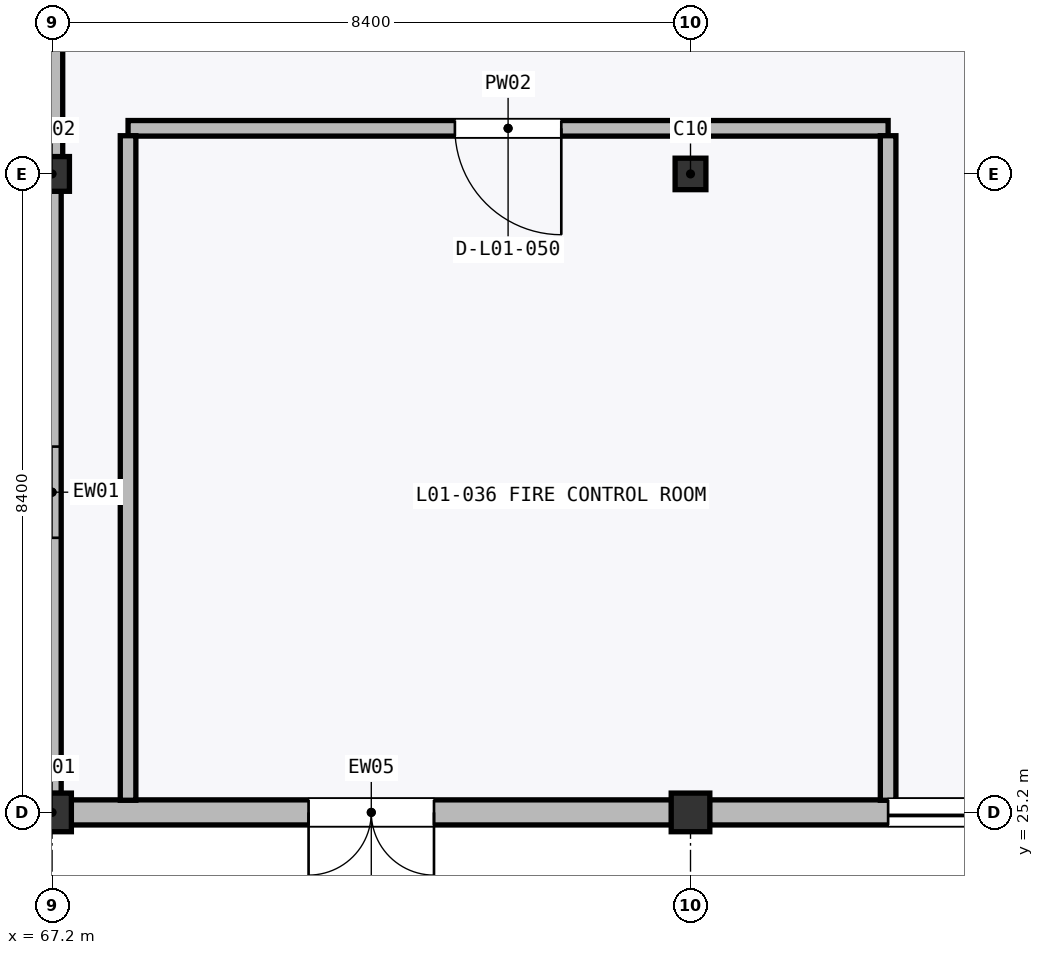
"""IFC4 building model, lengths in metres.
Left out: names, types, materials, properties, quantities, classifications, styles, units other than length and angle.
Written with IfcOpenShell. Run it as: python <this file> out.ifc"""

import sys

from ifc_helpers import new_model, si_unit, direction, frame, frame_2d, origin, origin_2d, place, context, subcontext, project, spatial, rectangle, hollow_circle, i_section, extrude, element, fill, save


model = new_model("IFC4")
c1 = context("Model", 3, precision=1e-05, world=origin(), true_north=direction((0.0, 1.0)))
c2 = subcontext(c1, "Body", "Model", "MODEL_VIEW")
j1 = project(units=[si_unit("LENGTHUNIT", "METRE"), si_unit("PLANEANGLEUNIT", "RADIAN")], contexts=[c1])
p1 = place(None, origin())
s1 = spatial("IfcSite", under=j1, at=p1, CompositionType="ELEMENT")
p2 = place(p1, origin())
s2 = spatial("IfcBuilding", under=s1, at=p2, CompositionType="ELEMENT")
p3 = place(p2, origin())
s3 = spatial("IfcBuildingStorey", under=s2, at=p3, CompositionType="ELEMENT", Elevation=0.0)
p4 = place(p3, frame((67.2, 25.2, 0.0), z_axis=(0.0, 0.0, 1.0), x_axis=(1.0, 0.0, 0.0)))
e1 = element("IfcColumn", 1, at=p4, inside=s3, PredefinedType="COLUMN", context=c2, shape_type="SweptSolid", body=[
    extrude(hollow_circle(Radius=0.254, WallThickness=0.016, at=origin_2d()), origin(), (0.0, 0.0, 1.0), 6.0),
])
p5 = place(p3, frame((67.2, 33.6, 0.0), z_axis=(0.0, 0.0, 1.0), x_axis=(1.0, 0.0, 0.0)))
e2 = element("IfcColumn", 2, at=p5, inside=s3, PredefinedType="COLUMN", context=c2, shape_type="SweptSolid", body=[
    extrude(hollow_circle(Radius=0.229, WallThickness=0.016, at=origin_2d()), origin(), (0.0, 0.0, 1.0), 6.0),
])
p6 = place(p3, frame((75.6, 25.2, 0.0), z_axis=(0.0, 0.0, 1.0), x_axis=(1.0, 0.0, 0.0)))
e3 = element("IfcColumn", 3, at=p6, inside=s3, PredefinedType="COLUMN", context=c2, shape_type="SweptSolid", body=[
    extrude(hollow_circle(Radius=0.254, WallThickness=0.016, at=origin_2d()), origin(), (0.0, 0.0, 1.0), 6.0),
])
p7 = place(p3, frame((75.6, 33.6, 0.0), z_axis=(0.0, 0.0, 1.0), x_axis=(1.0, 0.0, 0.0)))
e4 = element("IfcColumn", 4, at=p7, inside=s3, PredefinedType="COLUMN", context=c2, shape_type="SweptSolid", body=[
    extrude(i_section(OverallWidth=0.405, OverallDepth=0.414, WebThickness=0.018, FlangeThickness=0.028, FilletRadius=0.022, at=origin_2d()), origin(), (0.0, 0.0, 1.0), 6.0),
])
p8 = place(p3, frame((67.2, 41.655, 0.0), z_axis=(0.0, 0.0, 1.0), x_axis=(0.0, -1.0, 0.0)))
e5 = element("IfcWall", 5, at=p8, inside=s3, PredefinedType="STANDARD", context=c2, shape_type="SweptSolid", body=[
    extrude(rectangle(XDim=7.832, YDim=0.28, at=frame_2d((3.916, 0.0))), origin(), (0.0, 0.0, 1.0), 5.387),
])
p9 = place(p8, frame((2.916, 0.0, 0.95)))
e6 = element("IfcOpeningElement", 6, at=p9, cuts=e5, PredefinedType="OPENING", context=c2, shape_type="SweptSolid", body=[
    extrude(rectangle(XDim=2.0, YDim=1.6, at=frame_2d((1.0, 0.8))), frame((0.0, 0.15, 0.0), z_axis=(0.0, -1.0, 0.0), x_axis=(1.0, 0.0, 0.0)), (0.0, 0.0, 1.0), 0.3),
])
p10 = place(p3, frame((67.2, 33.376, 0.0), z_axis=(0.0, 0.0, 1.0), x_axis=(0.0, -1.0, 0.0)))
e7 = element("IfcWall", 7, at=p10, inside=s3, PredefinedType="STANDARD", context=c2, shape_type="SweptSolid", body=[
    extrude(rectangle(XDim=7.927, YDim=0.24, at=frame_2d((3.964, 0.0))), origin(), (0.0, 0.0, 1.0), 5.387),
])
p11 = place(p10, frame((3.364, 0.0, 0.95)))
e8 = element("IfcOpeningElement", 8, at=p11, cuts=e7, PredefinedType="OPENING", context=c2, shape_type="SweptSolid", body=[
    extrude(rectangle(XDim=1.2, YDim=1.8, at=frame_2d((0.6, 0.9))), frame((0.0, 0.13, 0.0), z_axis=(0.0, -1.0, 0.0), x_axis=(1.0, 0.0, 0.0)), (0.0, 0.0, 1.0), 0.26),
])
p12 = place(p3, frame((67.449, 25.2, 0.0), z_axis=(0.0, 0.0, 1.0), x_axis=(1.0, 0.0, 0.0)))
e9 = element("IfcWall", 9, at=p12, inside=s3, PredefinedType="STANDARD", context=c2, shape_type="SweptSolid", body=[
    extrude(rectangle(XDim=7.902, YDim=0.33, at=frame_2d((3.951, 0.0))), origin(), (0.0, 0.0, 1.0), 5.387),
])
p13 = place(p12, frame((3.126, 0.0, 0.0)))
e10 = element("IfcOpeningElement", 10, at=p13, cuts=e9, PredefinedType="OPENING", context=c2, shape_type="SweptSolid", body=[
    extrude(rectangle(XDim=1.65, YDim=2.15, at=frame_2d((0.825, 1.075))), frame((0.0, 0.175, 0.0), z_axis=(0.0, -1.0, 0.0), x_axis=(1.0, 0.0, 0.0)), (0.0, 0.0, 1.0), 0.35),
])
p14 = place(p3, frame((75.849, 25.2, 0.0), z_axis=(0.0, 0.0, 1.0), x_axis=(1.0, 0.0, 0.0)))
e11 = element("IfcWall", 11, at=p14, inside=s3, PredefinedType="STANDARD", context=c2, shape_type="SweptSolid", body=[
    extrude(rectangle(XDim=7.902, YDim=0.33, at=frame_2d((3.951, 0.0))), origin(), (0.0, 0.0, 1.0), 5.487),
])
p15 = place(p14, frame((2.351, 0.0, 0.0)))
e12 = element("IfcOpeningElement", 12, at=p15, cuts=e11, PredefinedType="OPENING", context=c2, shape_type="SweptSolid", body=[
    extrude(rectangle(XDim=3.2, YDim=3.6, at=frame_2d((1.6, 1.8))), frame((0.0, 0.175, 0.0), z_axis=(0.0, -1.0, 0.0), x_axis=(1.0, 0.0, 0.0)), (0.0, 0.0, 1.0), 0.35),
])
p16 = place(p3, frame((78.2, 34.2, 0.0), z_axis=(0.0, 0.0, 1.0), x_axis=(-1.0, 0.0, 0.0)))
e13 = element("IfcWall", 13, at=p16, inside=s3, PredefinedType="PARTITIONING", context=c2, shape_type="SweptSolid", body=[
    extrude(rectangle(XDim=10.0, YDim=0.205, at=frame_2d((5.0, 0.0))), origin(), (0.0, 0.0, 1.0), 5.745),
])
p17 = place(p16, frame((4.3, 0.0, 0.0)))
e14 = element("IfcOpeningElement", 14, at=p17, cuts=e13, PredefinedType="OPENING", context=c2, shape_type="SweptSolid", body=[
    extrude(rectangle(XDim=1.4, YDim=2.15, at=frame_2d((0.7, 1.075))), frame((0.0, 0.113, 0.0), z_axis=(0.0, -1.0, 0.0), x_axis=(1.0, 0.0, 0.0)), (0.0, 0.0, 1.0), 0.225),
])
p18 = place(p3, frame((78.2, 25.36, 0.0), z_axis=(0.0, 0.0, 1.0), x_axis=(0.0, 1.0, 0.0)))
e15 = element("IfcWall", 15, at=p18, inside=s3, PredefinedType="PARTITIONING", context=c2, shape_type="SweptSolid", body=[
    extrude(rectangle(XDim=8.742, YDim=0.205, at=frame_2d((4.371, 0.0))), origin(), (0.0, 0.0, 1.0), 5.287),
])
p19 = place(p3, frame((68.2, 34.103, 0.0), z_axis=(0.0, 0.0, 1.0), x_axis=(0.0, -1.0, 0.0)))
e16 = element("IfcWall", 16, at=p19, inside=s3, PredefinedType="PARTITIONING", context=c2, shape_type="SweptSolid", body=[
    extrude(rectangle(XDim=8.742, YDim=0.205, at=frame_2d((4.371, 0.0))), origin(), (0.0, 0.0, 1.0), 5.745),
])
p20 = place(p13, frame((1.65, 0.0, 0.0), z_axis=(0.0, 0.0, 1.0), x_axis=(-1.0, 0.0, 0.0)))
e17 = element("IfcDoor", 17, at=p20, inside=s3, OperationType="DOUBLE_DOOR_SINGLE_SWING", PredefinedType="DOOR", context=c2, shape_type="SweptSolid", body=[
    extrude(rectangle(XDim=1.65, YDim=2.15, at=frame_2d((0.825, 1.075))), frame((0.0, 0.025, 0.0), z_axis=(0.0, -1.0, 0.0), x_axis=(1.0, 0.0, 0.0)), (0.0, 0.0, 1.0), 0.05),
])
fill(e10, e17)
p21 = place(p15, frame((3.2, 0.0, 0.0), z_axis=(0.0, 0.0, 1.0), x_axis=(-1.0, 0.0, 0.0)))
e18 = element("IfcDoor", 18, at=p21, inside=s3, OperationType="DOUBLE_DOOR_SLIDING", PredefinedType="DOOR", context=c2, shape_type="SweptSolid", body=[
    extrude(rectangle(XDim=3.2, YDim=3.6, at=frame_2d((1.6, 1.8))), frame((0.0, 0.025, 0.0), z_axis=(0.0, -1.0, 0.0), x_axis=(1.0, 0.0, 0.0)), (0.0, 0.0, 1.0), 0.05),
])
fill(e12, e18)
p22 = place(p11, origin())
e19 = element("IfcWindow", 19, at=p22, inside=s3, PartitioningType="SINGLE_PANEL", PredefinedType="WINDOW", context=c2, shape_type="SweptSolid", body=[
    extrude(rectangle(XDim=1.2, YDim=1.8, at=frame_2d((0.6, 0.9))), frame((0.0, 0.03, 0.0), z_axis=(0.0, -1.0, 0.0), x_axis=(1.0, 0.0, 0.0)), (0.0, 0.0, 1.0), 0.06),
])
fill(e8, e19)
p23 = place(p17, origin())
e20 = element("IfcDoor", 20, at=p23, inside=s3, OperationType="SINGLE_SWING_LEFT", PredefinedType="DOOR", context=c2, shape_type="SweptSolid", body=[
    extrude(rectangle(XDim=1.4, YDim=2.15, at=frame_2d((0.7, 1.075))), frame((0.0, 0.025, 0.0), z_axis=(0.0, -1.0, 0.0), x_axis=(1.0, 0.0, 0.0)), (0.0, 0.0, 1.0), 0.05),
])
fill(e14, e20)
save(model, sys.argv[1])
